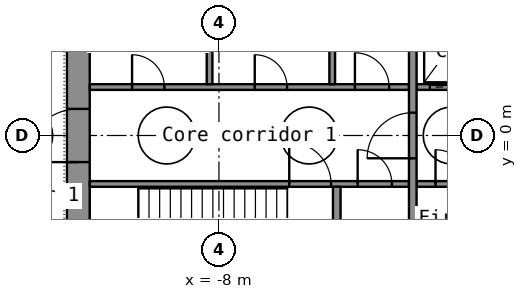
"""IFC4 building model, lengths in metres.
Left out: names, types, materials, properties, quantities, classifications, styles, units other than length and angle.
Written with IfcOpenShell. Run it as: python <this file> out.ifc"""

import sys

from ifc_helpers import new_model, si_unit, direction, frame, frame_2d, origin, place, context, subcontext, project, spatial, rectangle, extrude, element, fill, save


model = new_model("IFC4")
c1 = context("Model", 3, precision=1e-05, world=origin(), true_north=direction((0.0, 1.0)))
c2 = subcontext(c1, "Body", "Model", "MODEL_VIEW")
j1 = project(units=[si_unit("LENGTHUNIT", "METRE"), si_unit("PLANEANGLEUNIT", "RADIAN")], contexts=[c1])
p1 = place(None, origin())
s1 = spatial("IfcSite", under=j1, at=p1, CompositionType="ELEMENT")
p2 = place(p1, origin())
s2 = spatial("IfcBuilding", under=s1, at=p2, CompositionType="ELEMENT")
p3 = place(p2, frame((0.0, 0.0, -5.0)))
s3 = spatial("IfcBuildingStorey", under=s2, at=p3, CompositionType="ELEMENT", Elevation=-5.0)
p4 = place(p3, frame((-11.7, -7.2, 0.0), z_axis=(0.0, 0.0, 1.0), x_axis=(0.0, 1.0, 0.0)))
e1 = element("IfcWall", 1, at=p4, inside=s3, PredefinedType="SHEAR", context=c2, shape_type="SweptSolid", body=[
    extrude(rectangle(XDim=14.4, YDim=0.6, at=frame_2d((7.2, 0.0))), origin(), (0.0, 0.0, 1.0), 4.6),
])
p5 = place(p4, frame((6.5, 0.0, 0.0)))
e2 = element("IfcOpeningElement", 2, at=p5, cuts=e1, PredefinedType="OPENING", context=c2, shape_type="SweptSolid", body=[
    extrude(rectangle(XDim=1.4, YDim=2.2, at=frame_2d((0.7, 1.1))), frame((0.0, 0.31, 0.0), z_axis=(0.0, -1.0, 0.0), x_axis=(1.0, 0.0, 0.0)), (0.0, 0.0, 1.0), 0.62),
])
p6 = place(p3, frame((-11.4, -1.275, 0.0), z_axis=(0.0, 0.0, 1.0), x_axis=(1.0, 0.0, 0.0)))
e3 = element("IfcWall", 3, at=p6, inside=s3, PredefinedType="SHEAR", context=c2, shape_type="SweptSolid", body=[
    extrude(rectangle(XDim=8.4, YDim=0.15, at=frame_2d((4.2, 0.0))), origin(), (0.0, 0.0, 1.0), 4.6),
])
p7 = place(p6, frame((5.25, 0.0, 0.0)))
e4 = element("IfcOpeningElement", 4, at=p7, cuts=e3, PredefinedType="OPENING", context=c2, shape_type="SweptSolid", body=[
    extrude(rectangle(XDim=1.1, YDim=2.15, at=frame_2d((0.55, 1.075))), frame((0.0, 0.085, 0.0), z_axis=(0.0, -1.0, 0.0), x_axis=(1.0, 0.0, 0.0)), (0.0, 0.0, 1.0), 0.17),
])
p8 = place(p6, frame((7.05, 0.0, 0.0)))
e5 = element("IfcOpeningElement", 5, at=p8, cuts=e3, PredefinedType="OPENING", context=c2, shape_type="SweptSolid", body=[
    extrude(rectangle(XDim=0.9, YDim=2.1, at=frame_2d((0.45, 1.05))), frame((0.0, 0.085, 0.0), z_axis=(0.0, -1.0, 0.0), x_axis=(1.0, 0.0, 0.0)), (0.0, 0.0, 1.0), 0.17),
])
p9 = place(p3, frame((-2.8, -1.275, 0.0), z_axis=(0.0, 0.0, 1.0), x_axis=(1.0, 0.0, 0.0)))
e6 = element("IfcWall", 6, at=p9, inside=s3, PredefinedType="SHEAR", context=c2, shape_type="SweptSolid", body=[
    extrude(rectangle(XDim=5.6, YDim=0.15, at=frame_2d((2.8, 0.0))), origin(), (0.0, 0.0, 1.0), 4.6),
])
p10 = place(p9, frame((4.15, 0.0, 0.0)))
e7 = element("IfcOpeningElement", 7, at=p10, cuts=e6, PredefinedType="OPENING", context=c2, shape_type="SweptSolid", body=[
    extrude(rectangle(XDim=1.1, YDim=2.2, at=frame_2d((0.55, 1.1))), frame((0.0, 0.085, 0.0), z_axis=(0.0, -1.0, 0.0), x_axis=(1.0, 0.0, 0.0)), (0.0, 0.0, 1.0), 0.17),
])
p11 = place(p9, frame((0.499, 0.0, 0.0)))
e8 = element("IfcOpeningElement", 8, at=p11, cuts=e6, PredefinedType="OPENING", context=c2, shape_type="SweptSolid", body=[
    extrude(rectangle(XDim=0.9, YDim=2.1, at=frame_2d((0.45, 1.05))), frame((0.0, 0.085, 0.0), z_axis=(0.0, -1.0, 0.0), x_axis=(1.0, 0.0, 0.0)), (0.0, 0.0, 1.0), 0.17),
])
p12 = place(p9, frame((2.374, 0.0, 0.0)))
e9 = element("IfcOpeningElement", 9, at=p12, cuts=e6, PredefinedType="OPENING", context=c2, shape_type="SweptSolid", body=[
    extrude(rectangle(XDim=0.9, YDim=2.1, at=frame_2d((0.45, 1.05))), frame((0.0, 0.085, 0.0), z_axis=(0.0, -1.0, 0.0), x_axis=(1.0, 0.0, 0.0)), (0.0, 0.0, 1.0), 0.17),
])
p13 = place(p3, frame((-11.4, 1.275, 0.0), z_axis=(0.0, 0.0, 1.0), x_axis=(1.0, 0.0, 0.0)))
e10 = element("IfcWall", 10, at=p13, inside=s3, PredefinedType="PARTITIONING", context=c2, shape_type="SweptSolid", body=[
    extrude(rectangle(XDim=8.4, YDim=0.15, at=frame_2d((4.2, 0.0))), origin(), (0.0, 0.0, 1.0), 4.6),
])
p14 = place(p13, frame((1.114, 0.0, 0.0)))
e11 = element("IfcOpeningElement", 11, at=p14, cuts=e10, PredefinedType="OPENING", context=c2, shape_type="SweptSolid", body=[
    extrude(rectangle(XDim=0.85, YDim=2.1, at=frame_2d((0.425, 1.05))), frame((0.0, 0.085, 0.0), z_axis=(0.0, -1.0, 0.0), x_axis=(1.0, 0.0, 0.0)), (0.0, 0.0, 1.0), 0.17),
])
p15 = place(p13, frame((4.342, 0.0, 0.0)))
e12 = element("IfcOpeningElement", 12, at=p15, cuts=e10, PredefinedType="OPENING", context=c2, shape_type="SweptSolid", body=[
    extrude(rectangle(XDim=0.85, YDim=2.1, at=frame_2d((0.425, 1.05))), frame((0.0, 0.085, 0.0), z_axis=(0.0, -1.0, 0.0), x_axis=(1.0, 0.0, 0.0)), (0.0, 0.0, 1.0), 0.17),
])
p16 = place(p13, frame((6.978, 0.0, 0.0)))
e13 = element("IfcOpeningElement", 13, at=p16, cuts=e10, PredefinedType="OPENING", context=c2, shape_type="SweptSolid", body=[
    extrude(rectangle(XDim=0.9, YDim=2.1, at=frame_2d((0.45, 1.05))), frame((0.0, 0.085, 0.0), z_axis=(0.0, -1.0, 0.0), x_axis=(1.0, 0.0, 0.0)), (0.0, 0.0, 1.0), 0.17),
])
p17 = place(p3, frame((-2.8, 1.275, 0.0), z_axis=(0.0, 0.0, 1.0), x_axis=(1.0, 0.0, 0.0)))
e14 = element("IfcWall", 14, at=p17, inside=s3, PredefinedType="SHEAR", context=c2, shape_type="SweptSolid", body=[
    extrude(rectangle(XDim=5.6, YDim=0.15, at=frame_2d((2.8, 0.0))), origin(), (0.0, 0.0, 1.0), 4.6),
])
p18 = place(p17, frame((0.35, 0.0, 0.0)))
e15 = element("IfcOpeningElement", 15, at=p18, cuts=e14, PredefinedType="OPENING", context=c2, shape_type="SweptSolid", body=[
    extrude(rectangle(XDim=1.1, YDim=2.2, at=frame_2d((0.55, 1.1))), frame((0.0, 0.085, 0.0), z_axis=(0.0, -1.0, 0.0), x_axis=(1.0, 0.0, 0.0)), (0.0, 0.0, 1.0), 0.17),
])
p19 = place(p17, frame((2.413, 0.0, 0.0)))
e16 = element("IfcOpeningElement", 16, at=p19, cuts=e14, PredefinedType="OPENING", context=c2, shape_type="SweptSolid", body=[
    extrude(rectangle(XDim=0.9, YDim=2.1, at=frame_2d((0.45, 1.05))), frame((0.0, 0.085, 0.0), z_axis=(0.0, -1.0, 0.0), x_axis=(1.0, 0.0, 0.0)), (0.0, 0.0, 1.0), 0.17),
])
p20 = place(p17, frame((4.288, 0.0, 0.0)))
e17 = element("IfcOpeningElement", 17, at=p20, cuts=e14, PredefinedType="OPENING", context=c2, shape_type="SweptSolid", body=[
    extrude(rectangle(XDim=0.9, YDim=2.1, at=frame_2d((0.45, 1.05))), frame((0.0, 0.085, 0.0), z_axis=(0.0, -1.0, 0.0), x_axis=(1.0, 0.0, 0.0)), (0.0, 0.0, 1.0), 0.17),
])
p21 = place(p3, frame((-2.9, -3.7, 0.0), z_axis=(0.0, 0.0, 1.0), x_axis=(0.0, 1.0, 0.0)))
e18 = element("IfcWall", 18, at=p21, inside=s3, PredefinedType="SHEAR", context=c2, shape_type="SweptSolid", body=[
    extrude(rectangle(XDim=7.4, YDim=0.2, at=frame_2d((3.7, 0.0))), origin(), (0.0, 0.0, 1.0), 4.6),
])
p22 = place(p21, frame((3.1, 0.0, 0.0)))
e19 = element("IfcOpeningElement", 19, at=p22, cuts=e18, PredefinedType="OPENING", context=c2, shape_type="SweptSolid", body=[
    extrude(rectangle(XDim=1.2, YDim=2.2, at=frame_2d((0.6, 1.1))), frame((0.0, 0.11, 0.0), z_axis=(0.0, -1.0, 0.0), x_axis=(1.0, 0.0, 0.0)), (0.0, 0.0, 1.0), 0.22),
])
p23 = place(p3, frame((-4.9, -3.7, 0.0), z_axis=(0.0, 0.0, 1.0), x_axis=(0.0, 1.0, 0.0)))
e20 = element("IfcWall", 20, at=p23, inside=s3, PredefinedType="SHEAR", context=c2, shape_type="SweptSolid", body=[
    extrude(rectangle(XDim=2.35, YDim=0.2, at=frame_2d((1.175, 0.0))), origin(), (0.0, 0.0, 1.0), 4.6),
])
for number, where, z_axis, x_axis in (
    (21, (-8.247, 1.35, 0.0), (0.0, 0.0, 1.0), (0.0, 1.0, 0.0)),
    (22, (-5.019, 1.35, 0.0), (0.0, 0.0, 1.0), (0.0, 1.0, 0.0)),
):
    element("IfcWall", number, at=place(p3, frame(where, z_axis=z_axis, x_axis=x_axis)), inside=s3, PredefinedType="PARTITIONING", context=c2, shape_type="SweptSolid", body=[
        extrude(rectangle(XDim=2.35, YDim=0.15, at=frame_2d((1.175, 0.0))), origin(), (0.0, 0.0, 1.0), 4.6),
    ])
p24 = place(p5, origin())
e23 = element("IfcDoor", 23, at=p24, inside=s3, OperationType="DOUBLE_DOOR_SINGLE_SWING", PredefinedType="DOOR", context=c2, shape_type="SweptSolid", body=[
    extrude(rectangle(XDim=1.4, YDim=2.2, at=frame_2d((0.7, 1.1))), frame((0.0, 0.025, 0.0), z_axis=(0.0, -1.0, 0.0), x_axis=(1.0, 0.0, 0.0)), (0.0, 0.0, 1.0), 0.05),
])
fill(e2, e23)
p25 = place(p22, origin())
e24 = element("IfcDoor", 24, at=p25, inside=s3, OperationType="SINGLE_SWING_LEFT", PredefinedType="DOOR", context=c2, shape_type="SweptSolid", body=[
    extrude(rectangle(XDim=1.2, YDim=2.2, at=frame_2d((0.6, 1.1))), frame((0.0, 0.025, 0.0), z_axis=(0.0, -1.0, 0.0), x_axis=(1.0, 0.0, 0.0)), (0.0, 0.0, 1.0), 0.05),
])
fill(e19, e24)
p26 = place(p18, origin())
e25 = element("IfcDoor", 25, at=p26, inside=s3, OperationType="DOUBLE_DOOR_SLIDING", PredefinedType="DOOR", context=c2, shape_type="SweptSolid", body=[
    extrude(rectangle(XDim=1.1, YDim=2.2, at=frame_2d((0.55, 1.1))), frame((0.0, 0.025, 0.0), z_axis=(0.0, -1.0, 0.0), x_axis=(1.0, 0.0, 0.0)), (0.0, 0.0, 1.0), 0.05),
])
fill(e15, e25)
p27 = place(p7, origin())
e26 = element("IfcDoor", 26, at=p27, inside=s3, OperationType="SINGLE_SWING_LEFT", PredefinedType="DOOR", context=c2, shape_type="SweptSolid", body=[
    extrude(rectangle(XDim=1.1, YDim=2.15, at=frame_2d((0.55, 1.075))), frame((0.0, 0.025, 0.0), z_axis=(0.0, -1.0, 0.0), x_axis=(1.0, 0.0, 0.0)), (0.0, 0.0, 1.0), 0.05),
])
fill(e4, e26)
p28 = place(p14, origin())
e27 = element("IfcDoor", 27, at=p28, inside=s3, OperationType="SINGLE_SWING_LEFT", PredefinedType="DOOR", context=c2, shape_type="SweptSolid", body=[
    extrude(rectangle(XDim=0.85, YDim=2.1, at=frame_2d((0.425, 1.05))), frame((0.0, 0.025, 0.0), z_axis=(0.0, -1.0, 0.0), x_axis=(1.0, 0.0, 0.0)), (0.0, 0.0, 1.0), 0.05),
])
fill(e11, e27)
p29 = place(p15, origin())
e28 = element("IfcDoor", 28, at=p29, inside=s3, OperationType="SINGLE_SWING_LEFT", PredefinedType="DOOR", context=c2, shape_type="SweptSolid", body=[
    extrude(rectangle(XDim=0.85, YDim=2.1, at=frame_2d((0.425, 1.05))), frame((0.0, 0.025, 0.0), z_axis=(0.0, -1.0, 0.0), x_axis=(1.0, 0.0, 0.0)), (0.0, 0.0, 1.0), 0.05),
])
fill(e12, e28)
p30 = place(p16, origin())
e29 = element("IfcDoor", 29, at=p30, inside=s3, OperationType="SINGLE_SWING_LEFT", PredefinedType="DOOR", context=c2, shape_type="SweptSolid", body=[
    extrude(rectangle(XDim=0.9, YDim=2.1, at=frame_2d((0.45, 1.05))), frame((0.0, 0.025, 0.0), z_axis=(0.0, -1.0, 0.0), x_axis=(1.0, 0.0, 0.0)), (0.0, 0.0, 1.0), 0.05),
])
fill(e13, e29)
p31 = place(p11, origin())
e30 = element("IfcDoor", 30, at=p31, inside=s3, OperationType="SINGLE_SWING_LEFT", PredefinedType="DOOR", context=c2, shape_type="SweptSolid", body=[
    extrude(rectangle(XDim=0.9, YDim=2.1, at=frame_2d((0.45, 1.05))), frame((0.0, 0.025, 0.0), z_axis=(0.0, -1.0, 0.0), x_axis=(1.0, 0.0, 0.0)), (0.0, 0.0, 1.0), 0.05),
])
fill(e8, e30)
p32 = place(p8, origin())
e31 = element("IfcDoor", 31, at=p32, inside=s3, OperationType="SINGLE_SWING_LEFT", PredefinedType="DOOR", context=c2, shape_type="SweptSolid", body=[
    extrude(rectangle(XDim=0.9, YDim=2.1, at=frame_2d((0.45, 1.05))), frame((0.0, 0.025, 0.0), z_axis=(0.0, -1.0, 0.0), x_axis=(1.0, 0.0, 0.0)), (0.0, 0.0, 1.0), 0.05),
])
fill(e5, e31)
save(model, sys.argv[1])
